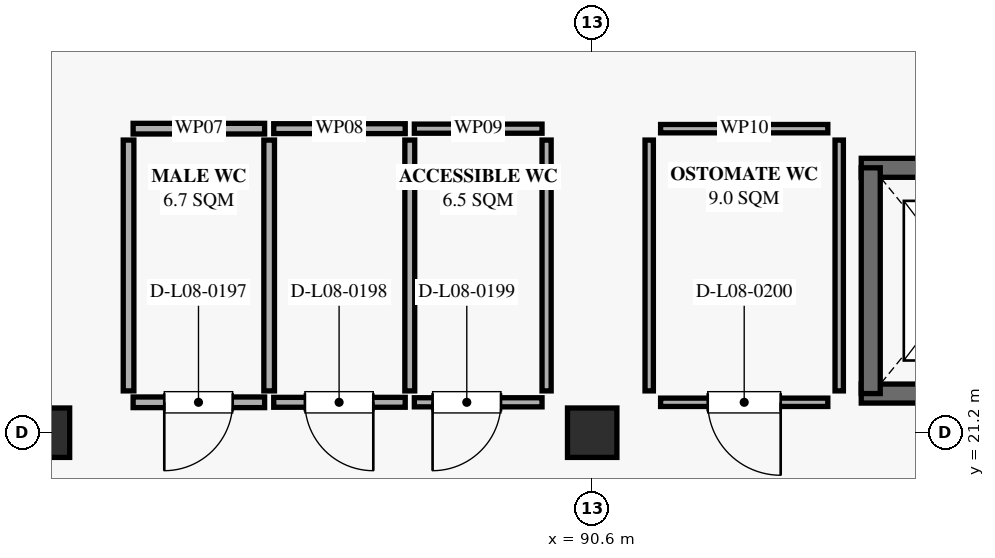
"""IFC4 building model, lengths in metres.
Left out: names, types, materials, properties, quantities, classifications, styles, units other than length and angle.
Written with IfcOpenShell. Run it as: python <this file> out.ifc"""

import sys

from ifc_helpers import new_model, si_unit, direction, frame, frame_2d, origin, origin_2d, place, context, subcontext, project, spatial, rectangle, extrude, element, fill, save


model = new_model("IFC4")
c1 = context("Model", 3, precision=1e-05, world=origin(), true_north=direction((0.0, 1.0)))
c2 = subcontext(c1, "Body", "Model", "MODEL_VIEW")
j1 = project(units=[si_unit("LENGTHUNIT", "METRE"), si_unit("PLANEANGLEUNIT", "RADIAN")], contexts=[c1])
p1 = place(None, origin())
s1 = spatial("IfcSite", under=j1, at=p1, CompositionType="ELEMENT")
p2 = place(p1, origin())
s2 = spatial("IfcBuilding", under=s1, at=p2, CompositionType="ELEMENT")
p3 = place(p2, frame((0.0, 0.0, 37.62)))
s3 = spatial("IfcBuildingStorey", under=s2, at=p3, CompositionType="ELEMENT", Elevation=37.62)
for number, where, z_axis, x_axis in (
    (1, (83.4, 21.2, 0.0), (0.0, 0.0, 1.0), (1.0, 0.0, 0.0)),
    (2, (90.6, 21.2, 0.0), (0.0, 0.0, 1.0), (1.0, 0.0, 0.0)),
):
    element("IfcColumn", number, at=place(p3, frame(where, z_axis=z_axis, x_axis=x_axis)), inside=s3, PredefinedType="COLUMN", context=c2, shape_type="SweptSolid", body=[
        extrude(rectangle(XDim=0.65, YDim=0.65, at=origin_2d()), origin(), (0.0, 0.0, 1.0), 4.32),
    ])
p4 = place(p3, frame((96.86, 21.715, 0.0), z_axis=(0.0, 0.0, 1.0), x_axis=(-1.0, 0.0, 0.0)))
e3 = element("IfcWall", 3, at=p4, inside=s3, PredefinedType="SHEAR", context=c2, shape_type="SweptSolid", body=[
    extrude(rectangle(XDim=2.72, YDim=0.25, at=frame_2d((1.36, 0.0))), origin(), (0.0, 0.0, 1.0), 4.05),
])
p5 = place(p4, frame((0.81, 0.0, 0.0)))
e4 = element("IfcOpeningElement", 4, at=p5, cuts=e3, PredefinedType="OPENING", context=c2, shape_type="SweptSolid", body=[
    extrude(rectangle(XDim=1.1, YDim=2.2, at=frame_2d((0.55, 1.1))), frame((0.0, 0.135, 0.0), z_axis=(0.0, -1.0, 0.0), x_axis=(1.0, 0.0, 0.0)), (0.0, 0.0, 1.0), 0.27),
])
p6 = place(p3, frame((94.14, 24.685, 0.0), z_axis=(0.0, 0.0, 1.0), x_axis=(1.0, 0.0, 0.0)))
e5 = element("IfcWall", 5, at=p6, inside=s3, PredefinedType="SHEAR", context=c2, shape_type="SweptSolid", body=[
    extrude(rectangle(XDim=2.72, YDim=0.25, at=frame_2d((1.36, 0.0))), origin(), (0.0, 0.0, 1.0), 4.05),
])
p7 = place(p3, frame((94.265, 21.715, 0.0), z_axis=(0.0, 0.0, 1.0), x_axis=(0.0, 1.0, 0.0)))
e6 = element("IfcWall", 6, at=p7, inside=s3, PredefinedType="SHEAR", context=c2, shape_type="SweptSolid", body=[
    extrude(rectangle(XDim=2.97, YDim=0.25, at=frame_2d((1.485, 0.0))), origin(), (0.0, 0.0, 1.0), 4.05),
])
p8 = place(p3, frame((86.29, 21.6, 0.0), z_axis=(0.0, 0.0, 1.0), x_axis=(-1.0, 0.0, 0.0)))
e7 = element("IfcWall", 7, at=p8, inside=s3, PredefinedType="PARTITIONING", context=c2, shape_type="SweptSolid", body=[
    extrude(rectangle(XDim=1.73, YDim=0.14, at=frame_2d((0.865, 0.0))), origin(), (0.0, 0.0, 1.0), 2.8),
])
p9 = place(p8, frame((0.42, 0.0, 0.0)))
e8 = element("IfcOpeningElement", 8, at=p9, cuts=e7, PredefinedType="OPENING", context=c2, shape_type="SweptSolid", body=[
    extrude(rectangle(XDim=0.9, YDim=2.05, at=frame_2d((0.45, 1.025))), frame((0.0, 0.08, 0.0), z_axis=(0.0, -1.0, 0.0), x_axis=(1.0, 0.0, 0.0)), (0.0, 0.0, 1.0), 0.16),
])
p10 = place(p3, frame((84.56, 25.2, 0.0), z_axis=(0.0, 0.0, 1.0), x_axis=(1.0, 0.0, 0.0)))
e9 = element("IfcWall", 9, at=p10, inside=s3, PredefinedType="PARTITIONING", context=c2, shape_type="SweptSolid", body=[
    extrude(rectangle(XDim=1.73, YDim=0.14, at=frame_2d((0.865, 0.0))), origin(), (0.0, 0.0, 1.0), 2.8),
])
for number, where, z_axis, x_axis in (
    (10, (84.5, 21.75, 0.0), (0.0, 0.0, 1.0), (0.0, 1.0, 0.0)),
    (11, (86.35, 25.05, 0.0), (0.0, 0.0, 1.0), (0.0, -1.0, 0.0)),
):
    element("IfcWall", number, at=place(p3, frame(where, z_axis=z_axis, x_axis=x_axis)), inside=s3, PredefinedType="PARTITIONING", context=c2, shape_type="SweptSolid", body=[
        extrude(rectangle(XDim=3.3, YDim=0.14, at=frame_2d((1.65, 0.0))), origin(), (0.0, 0.0, 1.0), 2.8),
    ])
p11 = place(p3, frame((88.14, 21.6, 0.0), z_axis=(0.0, 0.0, 1.0), x_axis=(-1.0, 0.0, 0.0)))
e12 = element("IfcWall", 12, at=p11, inside=s3, PredefinedType="PARTITIONING", context=c2, shape_type="SweptSolid", body=[
    extrude(rectangle(XDim=1.73, YDim=0.13, at=frame_2d((0.865, 0.0))), origin(), (0.0, 0.0, 1.0), 2.8),
])
p12 = place(p11, frame((0.42, 0.0, 0.0)))
e13 = element("IfcOpeningElement", 13, at=p12, cuts=e12, PredefinedType="OPENING", context=c2, shape_type="SweptSolid", body=[
    extrude(rectangle(XDim=0.9, YDim=2.1, at=frame_2d((0.45, 1.05))), frame((0.0, 0.075, 0.0), z_axis=(0.0, -1.0, 0.0), x_axis=(1.0, 0.0, 0.0)), (0.0, 0.0, 1.0), 0.15),
])
p13 = place(p3, frame((86.41, 25.2, 0.0), z_axis=(0.0, 0.0, 1.0), x_axis=(1.0, 0.0, 0.0)))
e14 = element("IfcWall", 14, at=p13, inside=s3, PredefinedType="PARTITIONING", context=c2, shape_type="SweptSolid", body=[
    extrude(rectangle(XDim=1.73, YDim=0.13, at=frame_2d((0.865, 0.0))), origin(), (0.0, 0.0, 1.0), 2.8),
])
p14 = place(p3, frame((88.2, 25.05, 0.0), z_axis=(0.0, 0.0, 1.0), x_axis=(0.0, -1.0, 0.0)))
e15 = element("IfcWall", 15, at=p14, inside=s3, PredefinedType="PARTITIONING", context=c2, shape_type="SweptSolid", body=[
    extrude(rectangle(XDim=3.3, YDim=0.13, at=frame_2d((1.65, 0.0))), origin(), (0.0, 0.0, 1.0), 2.8),
])
p15 = place(p3, frame((89.94, 21.6, 0.0), z_axis=(0.0, 0.0, 1.0), x_axis=(-1.0, 0.0, 0.0)))
e16 = element("IfcWall", 16, at=p15, inside=s3, PredefinedType="PARTITIONING", context=c2, shape_type="SweptSolid", body=[
    extrude(rectangle(XDim=1.68, YDim=0.12, at=frame_2d((0.84, 0.0))), origin(), (0.0, 0.0, 1.0), 2.8),
])
p16 = place(p15, frame((0.54, 0.0, 0.0)))
e17 = element("IfcOpeningElement", 17, at=p16, cuts=e16, PredefinedType="OPENING", context=c2, shape_type="SweptSolid", body=[
    extrude(rectangle(XDim=0.9, YDim=2.16, at=frame_2d((0.45, 1.08))), frame((0.0, 0.07, 0.0), z_axis=(0.0, -1.0, 0.0), x_axis=(1.0, 0.0, 0.0)), (0.0, 0.0, 1.0), 0.14),
])
p17 = place(p3, frame((88.26, 25.2, 0.0), z_axis=(0.0, 0.0, 1.0), x_axis=(1.0, 0.0, 0.0)))
e18 = element("IfcWall", 18, at=p17, inside=s3, PredefinedType="PARTITIONING", context=c2, shape_type="SweptSolid", body=[
    extrude(rectangle(XDim=1.68, YDim=0.12, at=frame_2d((0.84, 0.0))), origin(), (0.0, 0.0, 1.0), 2.8),
])
p18 = place(p3, frame((90.0, 25.05, 0.0), z_axis=(0.0, 0.0, 1.0), x_axis=(0.0, -1.0, 0.0)))
e19 = element("IfcWall", 19, at=p18, inside=s3, PredefinedType="PARTITIONING", context=c2, shape_type="SweptSolid", body=[
    extrude(rectangle(XDim=3.3, YDim=0.12, at=frame_2d((1.65, 0.0))), origin(), (0.0, 0.0, 1.0), 2.8),
])
p19 = place(p3, frame((93.7, 21.6, 0.0), z_axis=(0.0, 0.0, 1.0), x_axis=(-1.0, 0.0, 0.0)))
e20 = element("IfcWall", 20, at=p19, inside=s3, PredefinedType="PARTITIONING", context=c2, shape_type="SweptSolid", body=[
    extrude(rectangle(XDim=2.2, YDim=0.11, at=frame_2d((1.1, 0.0))), origin(), (0.0, 0.0, 1.0), 2.8),
])
p20 = place(p19, frame((0.62, 0.0, 0.0)))
e21 = element("IfcOpeningElement", 21, at=p20, cuts=e20, PredefinedType="OPENING", context=c2, shape_type="SweptSolid", body=[
    extrude(rectangle(XDim=0.96, YDim=2.22, at=frame_2d((0.48, 1.11))), frame((0.0, 0.065, 0.0), z_axis=(0.0, -1.0, 0.0), x_axis=(1.0, 0.0, 0.0)), (0.0, 0.0, 1.0), 0.13),
])
p21 = place(p3, frame((91.5, 25.2, 0.0), z_axis=(0.0, 0.0, 1.0), x_axis=(1.0, 0.0, 0.0)))
e22 = element("IfcWall", 22, at=p21, inside=s3, PredefinedType="PARTITIONING", context=c2, shape_type="SweptSolid", body=[
    extrude(rectangle(XDim=2.2, YDim=0.11, at=frame_2d((1.1, 0.0))), origin(), (0.0, 0.0, 1.0), 2.8),
])
for number, where, z_axis, x_axis in (
    (23, (91.35, 21.75, 0.0), (0.0, 0.0, 1.0), (0.0, 1.0, 0.0)),
    (24, (93.85, 25.05, 0.0), (0.0, 0.0, 1.0), (0.0, -1.0, 0.0)),
):
    element("IfcWall", number, at=place(p3, frame(where, z_axis=z_axis, x_axis=x_axis)), inside=s3, PredefinedType="PARTITIONING", context=c2, shape_type="SweptSolid", body=[
        extrude(rectangle(XDim=3.3, YDim=0.11, at=frame_2d((1.65, 0.0))), origin(), (0.0, 0.0, 1.0), 2.8),
    ])
p22 = place(p9, origin())
e25 = element("IfcDoor", 25, at=p22, inside=s3, OperationType="SINGLE_SWING_RIGHT", PredefinedType="DOOR", context=c2, shape_type="SweptSolid", body=[
    extrude(rectangle(XDim=0.9, YDim=2.05, at=frame_2d((0.45, 1.025))), frame((0.0, 0.025, 0.0), z_axis=(0.0, -1.0, 0.0), x_axis=(1.0, 0.0, 0.0)), (0.0, 0.0, 1.0), 0.05),
])
fill(e8, e25)
p23 = place(p12, origin())
e26 = element("IfcDoor", 26, at=p23, inside=s3, OperationType="SINGLE_SWING_LEFT", PredefinedType="DOOR", context=c2, shape_type="SweptSolid", body=[
    extrude(rectangle(XDim=0.9, YDim=2.1, at=frame_2d((0.45, 1.05))), frame((0.0, 0.025, 0.0), z_axis=(0.0, -1.0, 0.0), x_axis=(1.0, 0.0, 0.0)), (0.0, 0.0, 1.0), 0.05),
])
fill(e13, e26)
p24 = place(p16, origin())
e27 = element("IfcDoor", 27, at=p24, inside=s3, OperationType="SINGLE_SWING_RIGHT", PredefinedType="DOOR", context=c2, shape_type="SweptSolid", body=[
    extrude(rectangle(XDim=0.9, YDim=2.16, at=frame_2d((0.45, 1.08))), frame((0.0, 0.025, 0.0), z_axis=(0.0, -1.0, 0.0), x_axis=(1.0, 0.0, 0.0)), (0.0, 0.0, 1.0), 0.05),
])
fill(e17, e27)
p25 = place(p20, origin())
e28 = element("IfcDoor", 28, at=p25, inside=s3, OperationType="SINGLE_SWING_LEFT", PredefinedType="DOOR", context=c2, shape_type="SweptSolid", body=[
    extrude(rectangle(XDim=0.96, YDim=2.22, at=frame_2d((0.48, 1.11))), frame((0.0, 0.025, 0.0), z_axis=(0.0, -1.0, 0.0), x_axis=(1.0, 0.0, 0.0)), (0.0, 0.0, 1.0), 0.05),
])
fill(e21, e28)
save(model, sys.argv[1])
